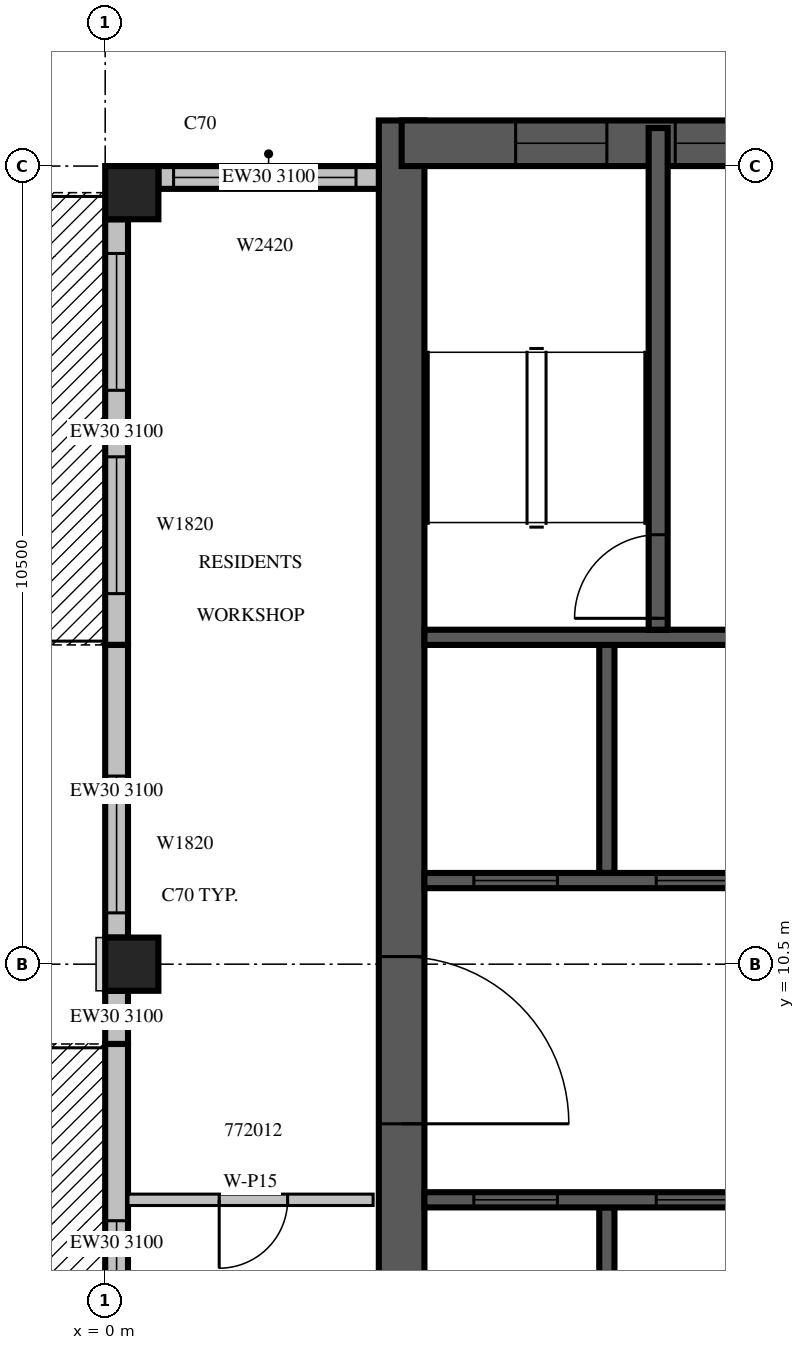
"""IFC4 building model, lengths in metres.
Left out: names, types, materials, properties, quantities, classifications, styles, units other than length and angle.
Written with IfcOpenShell. Run it as: python <this file> out.ifc"""

import sys

from ifc_helpers import new_model, si_unit, direction, frame, frame_2d, origin, origin_2d, place, context, subcontext, project, spatial, rectangle, extrude, source, transform, mapped, element, fill, save


model = new_model("IFC4")
c1 = context("Model", 3, precision=1e-05, world=origin(), true_north=direction((0.0, 1.0)))
c2 = subcontext(c1, "Body", "Model", "MODEL_VIEW")
j1 = project(units=[si_unit("LENGTHUNIT", "METRE"), si_unit("PLANEANGLEUNIT", "RADIAN")], contexts=[c1])
p1 = place(None, origin())
s1 = spatial("IfcSite", under=j1, at=p1, CompositionType="ELEMENT")
p2 = place(p1, origin())
s2 = spatial("IfcBuilding", under=s1, at=p2, CompositionType="ELEMENT")
p3 = place(p2, frame((0.0, 0.0, 312.5)))
s3 = spatial("IfcBuildingStorey", under=s2, at=p3, CompositionType="ELEMENT", Elevation=312.5)
m1 = source(origin(), c2, "Body", "SweptSolid", [
    extrude(rectangle(XDim=0.7, YDim=0.7, at=origin_2d()), origin(), (0.0, 0.0, 1.0), 3.5),
])
for number, where, z_axis, x_axis in (
    (1, (0.35, 10.5, 0.0), (0.0, 0.0, 1.0), (1.0, 0.0, 0.0)),
    (2, (0.35, 20.65, 0.0), (0.0, 0.0, 1.0), (1.0, 0.0, 0.0)),
):
    element("IfcColumn", number, at=place(p3, frame(where, z_axis=z_axis, x_axis=x_axis)), inside=s3, PredefinedType="COLUMN", context=c2, shape_type="MappedRepresentation", body=[
        mapped(m1, transform((0.0, 0.0, 0.0), scale=1.0)),
    ])
m2 = source(origin(), c2, "Body", "SweptSolid", [
    extrude(rectangle(XDim=17.4, YDim=0.6, at=frame_2d((8.7, 0.0))), origin(), (0.0, 0.0, 1.0), 3.5),
])
p4 = place(p3, frame((3.9, 4.2, 0.0), z_axis=(0.0, 0.0, 1.0), x_axis=(0.0, 1.0, 0.0)))
e3 = element("IfcWall", 3, at=p4, inside=s3, PredefinedType="SHEAR", context=c2, shape_type="MappedRepresentation", body=[
    mapped(m2, transform((0.0, 0.0, 0.0), scale=1.0)),
])
m3 = source(origin(), c2, "Body", "SweptSolid", [
    extrude(rectangle(XDim=2.2, YDim=2.1, at=frame_2d((1.1, 1.05))), frame((0.0, 0.31, 0.0), z_axis=(0.0, -1.0, 0.0), x_axis=(1.0, 0.0, 0.0)), (0.0, 0.0, 1.0), 0.62),
])
p5 = place(p4, frame((4.2, 0.0, 0.0)))
e4 = element("IfcOpeningElement", 4, at=p5, cuts=e3, PredefinedType="OPENING", context=c2, shape_type="MappedRepresentation", body=[
    mapped(m3, transform((0.0, 0.0, 0.0), scale=1.0)),
])
m4 = source(origin(), c2, "Body", "SweptSolid", [
    extrude(rectangle(XDim=6.6, YDim=0.6, at=frame_2d((3.3, 0.0))), origin(), (0.0, 0.0, 1.0), 3.5),
])
p6 = place(p3, frame((3.9, 21.3, 0.0), z_axis=(0.0, 0.0, 1.0), x_axis=(1.0, 0.0, 0.0)))
e5 = element("IfcWall", 5, at=p6, inside=s3, PredefinedType="SHEAR", context=c2, shape_type="MappedRepresentation", body=[
    mapped(m4, transform((0.0, 0.0, 0.0), scale=1.0)),
])
m5 = source(origin(), c2, "Body", "SweptSolid", [
    extrude(rectangle(XDim=1.2, YDim=2.4, at=frame_2d((0.6, 1.2))), frame((0.0, 0.31, 0.0), z_axis=(0.0, -1.0, 0.0), x_axis=(1.0, 0.0, 0.0)), (0.0, 0.0, 1.0), 0.62),
])
p7 = place(p6, frame((1.5, 0.0, 0.6)))
e6 = element("IfcOpeningElement", 6, at=p7, cuts=e5, PredefinedType="OPENING", context=c2, shape_type="MappedRepresentation", body=[
    mapped(m5, transform((0.0, 0.0, 0.0), scale=1.0)),
])
p8 = place(p6, frame((3.6, 0.0, 0.6)))
e7 = element("IfcOpeningElement", 7, at=p8, cuts=e5, PredefinedType="OPENING", context=c2, shape_type="MappedRepresentation", body=[
    mapped(m5, transform((0.0, 0.0, 0.0), scale=1.0)),
])
m6 = source(origin(), c2, "Body", "SweptSolid", [
    extrude(rectangle(XDim=2.9, YDim=0.3, at=frame_2d((1.45, 0.0))), origin(), (0.0, 0.0, 1.0), 3.1),
])
p9 = place(p3, frame((3.6, 20.85, 0.0), z_axis=(0.0, 0.0, 1.0), x_axis=(-1.0, 0.0, 0.0)))
e8 = element("IfcWall", 8, at=p9, inside=s3, PredefinedType="STANDARD", context=c2, shape_type="MappedRepresentation", body=[
    mapped(m6, transform((0.0, 0.0, 0.0), scale=1.0)),
])
m7 = source(origin(), c2, "Body", "SweptSolid", [
    extrude(rectangle(XDim=2.4, YDim=2.0, at=frame_2d((1.2, 1.0))), frame((0.0, 0.16, 0.0), z_axis=(0.0, -1.0, 0.0), x_axis=(1.0, 0.0, 0.0)), (0.0, 0.0, 1.0), 0.32),
])
p10 = place(p9, frame((0.3, 0.0, 0.6)))
e9 = element("IfcOpeningElement", 9, at=p10, cuts=e8, PredefinedType="OPENING", context=c2, shape_type="MappedRepresentation", body=[
    mapped(m7, transform((0.0, 0.0, 0.0), scale=1.0)),
])
m8 = source(origin(), c2, "Body", "SweptSolid", [
    extrude(rectangle(XDim=5.6, YDim=0.3, at=frame_2d((2.8, 0.0))), origin(), (0.0, 0.0, 1.0), 3.1),
])
p11 = place(p3, frame((0.15, 20.3, 0.0), z_axis=(0.0, 0.0, 1.0), x_axis=(0.0, -1.0, 0.0)))
e10 = element("IfcWall", 10, at=p11, inside=s3, PredefinedType="STANDARD", context=c2, shape_type="MappedRepresentation", body=[
    mapped(m8, transform((0.0, 0.0, 0.0), scale=1.0)),
])
m9 = source(origin(), c2, "Body", "SweptSolid", [
    extrude(rectangle(XDim=1.8, YDim=2.4, at=frame_2d((0.9, 1.2))), frame((0.0, 0.16, 0.0), z_axis=(0.0, -1.0, 0.0), x_axis=(1.0, 0.0, 0.0)), (0.0, 0.0, 1.0), 0.32),
])
p12 = place(p11, frame((0.45, 0.0, 0.0)))
e11 = element("IfcOpeningElement", 11, at=p12, cuts=e10, PredefinedType="OPENING", context=c2, shape_type="MappedRepresentation", body=[
    mapped(m9, transform((0.0, 0.0, 0.0), scale=1.0)),
])
m10 = source(origin(), c2, "Body", "SweptSolid", [
    extrude(rectangle(XDim=1.8, YDim=2.0, at=frame_2d((0.9, 1.0))), frame((0.0, 0.16, 0.0), z_axis=(0.0, -1.0, 0.0), x_axis=(1.0, 0.0, 0.0)), (0.0, 0.0, 1.0), 0.32),
])
p13 = place(p11, frame((3.125, 0.0, 0.6)))
e12 = element("IfcOpeningElement", 12, at=p13, cuts=e10, PredefinedType="OPENING", context=c2, shape_type="MappedRepresentation", body=[
    mapped(m10, transform((0.0, 0.0, 0.0), scale=1.0)),
])
m11 = source(origin(), c2, "Body", "SweptSolid", [
    extrude(rectangle(XDim=3.85, YDim=0.3, at=frame_2d((1.925, 0.0))), origin(), (0.0, 0.0, 1.0), 3.1),
])
p14 = place(p3, frame((0.15, 14.7, 0.0), z_axis=(0.0, 0.0, 1.0), x_axis=(0.0, -1.0, 0.0)))
e13 = element("IfcWall", 13, at=p14, inside=s3, PredefinedType="STANDARD", context=c2, shape_type="MappedRepresentation", body=[
    mapped(m11, transform((0.0, 0.0, 0.0), scale=1.0)),
])
p15 = place(p14, frame((1.725, 0.0, 0.6)))
e14 = element("IfcOpeningElement", 14, at=p15, cuts=e13, PredefinedType="OPENING", context=c2, shape_type="MappedRepresentation", body=[
    mapped(m10, transform((0.0, 0.0, 0.0), scale=1.0)),
])
m12 = source(origin(), c2, "Body", "SweptSolid", [
    extrude(rectangle(XDim=0.7, YDim=0.3, at=frame_2d((0.35, 0.0))), origin(), (0.0, 0.0, 1.0), 3.1),
])
p16 = place(p3, frame((0.15, 10.15, 0.0), z_axis=(0.0, 0.0, 1.0), x_axis=(0.0, -1.0, 0.0)))
e15 = element("IfcWall", 15, at=p16, inside=s3, PredefinedType="STANDARD", context=c2, shape_type="MappedRepresentation", body=[
    mapped(m12, transform((0.0, 0.0, 0.0), scale=1.0)),
])
m13 = source(origin(), c2, "Body", "SweptSolid", [
    extrude(rectangle(XDim=5.25, YDim=0.3, at=frame_2d((2.625, 0.0))), origin(), (0.0, 0.0, 1.0), 3.1),
])
p17 = place(p3, frame((0.15, 9.45, 0.0), z_axis=(0.0, 0.0, 1.0), x_axis=(0.0, -1.0, 0.0)))
e16 = element("IfcWall", 16, at=p17, inside=s3, PredefinedType="STANDARD", context=c2, shape_type="MappedRepresentation", body=[
    mapped(m13, transform((0.0, 0.0, 0.0), scale=1.0)),
])
p18 = place(p17, frame((2.325, 0.0, 0.0)))
e17 = element("IfcOpeningElement", 17, at=p18, cuts=e16, PredefinedType="OPENING", context=c2, shape_type="MappedRepresentation", body=[
    mapped(m9, transform((0.0, 0.0, 0.0), scale=1.0)),
])
m14 = source(origin(), c2, "Body", "SweptSolid", [
    extrude(rectangle(XDim=3.1, YDim=0.2, at=frame_2d((1.55, 0.0))), origin(), (0.0, 0.0, 1.0), 3.5),
])
p19 = place(p3, frame((6.6, 4.2, 0.0), z_axis=(0.0, 0.0, 1.0), x_axis=(0.0, 1.0, 0.0)))
e18 = element("IfcWall", 18, at=p19, inside=s3, PredefinedType="SOLIDWALL", context=c2, shape_type="MappedRepresentation", body=[
    mapped(m14, transform((0.0, 0.0, 0.0), scale=1.0)),
])
m15 = source(origin(), c2, "Body", "SweptSolid", [
    extrude(rectangle(XDim=3.0, YDim=0.2, at=frame_2d((1.5, 0.0))), origin(), (0.0, 0.0, 1.0), 3.5),
])
p20 = place(p3, frame((6.6, 11.7, 0.0), z_axis=(0.0, 0.0, 1.0), x_axis=(0.0, 1.0, 0.0)))
e19 = element("IfcWall", 19, at=p20, inside=s3, PredefinedType="SOLIDWALL", context=c2, shape_type="MappedRepresentation", body=[
    mapped(m15, transform((0.0, 0.0, 0.0), scale=1.0)),
])
m16 = source(origin(), c2, "Body", "SweptSolid", [
    extrude(rectangle(XDim=9.6, YDim=0.2, at=frame_2d((4.8, 0.0))), origin(), (0.0, 0.0, 1.0), 3.5),
])
p21 = place(p3, frame((4.2, 7.4, 0.0), z_axis=(0.0, 0.0, 1.0), x_axis=(1.0, 0.0, 0.0)))
e20 = element("IfcWall", 20, at=p21, inside=s3, PredefinedType="SOLIDWALL", context=c2, shape_type="MappedRepresentation", body=[
    mapped(m16, transform((0.0, 0.0, 0.0), scale=1.0)),
])
m17 = source(origin(), c2, "Body", "SweptSolid", [
    extrude(rectangle(XDim=1.1, YDim=2.1, at=frame_2d((0.55, 1.05))), frame((0.0, 0.11, 0.0), z_axis=(0.0, -1.0, 0.0), x_axis=(1.0, 0.0, 0.0)), (0.0, 0.0, 1.0), 0.22),
])
p22 = place(p21, frame((0.65, 0.0, 0.0)))
e21 = element("IfcOpeningElement", 21, at=p22, cuts=e20, PredefinedType="OPENING", context=c2, shape_type="MappedRepresentation", body=[
    mapped(m17, transform((0.0, 0.0, 0.0), scale=1.0)),
])
p23 = place(p21, frame((3.05, 0.0, 0.0)))
e22 = element("IfcOpeningElement", 22, at=p23, cuts=e20, PredefinedType="OPENING", context=c2, shape_type="MappedRepresentation", body=[
    mapped(m17, transform((0.0, 0.0, 0.0), scale=1.0)),
])
p24 = place(p21, frame((5.45, 0.0, 0.0)))
e23 = element("IfcOpeningElement", 23, at=p24, cuts=e20, PredefinedType="OPENING", context=c2, shape_type="MappedRepresentation", body=[
    mapped(m17, transform((0.0, 0.0, 0.0), scale=1.0)),
])
p25 = place(p21, frame((7.85, 0.0, 0.0)))
e24 = element("IfcOpeningElement", 24, at=p25, cuts=e20, PredefinedType="OPENING", context=c2, shape_type="MappedRepresentation", body=[
    mapped(m17, transform((0.0, 0.0, 0.0), scale=1.0)),
])
m18 = source(origin(), c2, "Body", "SweptSolid", [
    extrude(rectangle(XDim=4.8, YDim=0.2, at=frame_2d((2.4, 0.0))), origin(), (0.0, 0.0, 1.0), 3.5),
])
p26 = place(p3, frame((4.2, 11.6, 0.0), z_axis=(0.0, 0.0, 1.0), x_axis=(1.0, 0.0, 0.0)))
e25 = element("IfcWall", 25, at=p26, inside=s3, PredefinedType="SOLIDWALL", context=c2, shape_type="MappedRepresentation", body=[
    mapped(m18, transform((0.0, 0.0, 0.0), scale=1.0)),
])
p27 = place(p26, frame((0.65, 0.0, 0.0)))
e26 = element("IfcOpeningElement", 26, at=p27, cuts=e25, PredefinedType="OPENING", context=c2, shape_type="MappedRepresentation", body=[
    mapped(m17, transform((0.0, 0.0, 0.0), scale=1.0)),
])
p28 = place(p26, frame((3.05, 0.0, 0.0)))
e27 = element("IfcOpeningElement", 27, at=p28, cuts=e25, PredefinedType="OPENING", context=c2, shape_type="MappedRepresentation", body=[
    mapped(m17, transform((0.0, 0.0, 0.0), scale=1.0)),
])
p29 = place(p3, frame((4.2, 14.8, 0.0), z_axis=(0.0, 0.0, 1.0), x_axis=(1.0, 0.0, 0.0)))
e28 = element("IfcWall", 28, at=p29, inside=s3, PredefinedType="SOLIDWALL", context=c2, shape_type="MappedRepresentation", body=[
    mapped(m18, transform((0.0, 0.0, 0.0), scale=1.0)),
])
m19 = source(origin(), c2, "Body", "SweptSolid", [
    extrude(rectangle(XDim=6.6, YDim=0.25, at=frame_2d((3.3, 0.0))), origin(), (0.0, 0.0, 1.0), 3.1),
])
p30 = place(p3, frame((7.275, 14.9, 0.0), z_axis=(0.0, 0.0, 1.0), x_axis=(0.0, 1.0, 0.0)))
e29 = element("IfcWall", 29, at=p30, inside=s3, PredefinedType="SOLIDWALL", context=c2, shape_type="MappedRepresentation", body=[
    mapped(m19, transform((0.0, 0.0, 0.0), scale=1.0)),
])
m20 = source(origin(), c2, "Body", "SweptSolid", [
    extrude(rectangle(XDim=1.1, YDim=2.1, at=frame_2d((0.55, 1.05))), frame((0.0, 0.135, 0.0), z_axis=(0.0, -1.0, 0.0), x_axis=(1.0, 0.0, 0.0)), (0.0, 0.0, 1.0), 0.27),
])
p31 = place(p30, frame((0.15, 0.0, 0.0)))
e30 = element("IfcOpeningElement", 30, at=p31, cuts=e29, PredefinedType="OPENING", context=c2, shape_type="MappedRepresentation", body=[
    mapped(m20, transform((0.0, 0.0, 0.0), scale=1.0)),
])
m21 = source(origin(), c2, "Body", "SweptSolid", [
    extrude(rectangle(XDim=3.225, YDim=0.15, at=frame_2d((1.613, 0.0))), origin(), (0.0, 0.0, 1.0), 3.1),
])
p32 = place(p3, frame((0.3, 7.4, 0.0), z_axis=(0.0, 0.0, 1.0), x_axis=(1.0, 0.0, 0.0)))
e31 = element("IfcWall", 31, at=p32, inside=s3, PredefinedType="PARTITIONING", context=c2, shape_type="MappedRepresentation", body=[
    mapped(m21, transform((0.0, 0.0, 0.0), scale=1.0)),
])
m22 = source(origin(), c2, "Body", "SweptSolid", [
    extrude(rectangle(XDim=0.9, YDim=2.1, at=frame_2d((0.45, 1.05))), frame((0.0, 0.085, 0.0), z_axis=(0.0, -1.0, 0.0), x_axis=(1.0, 0.0, 0.0)), (0.0, 0.0, 1.0), 0.17),
])
p33 = place(p32, frame((1.2, 0.0, 0.0)))
e32 = element("IfcOpeningElement", 32, at=p33, cuts=e31, PredefinedType="OPENING", context=c2, shape_type="MappedRepresentation", body=[
    mapped(m22, transform((0.0, 0.0, 0.0), scale=1.0)),
])
m23 = source(origin(), c2, "Body", "SweptSolid", [
    extrude(rectangle(XDim=2.4, YDim=2.0, at=frame_2d((1.2, 1.0))), frame((0.0, 0.03, 0.0), z_axis=(0.0, -1.0, 0.0), x_axis=(1.0, 0.0, 0.0)), (0.0, 0.0, 1.0), 0.06),
])
p34 = place(p10, origin())
e33 = element("IfcWindow", 33, at=p34, inside=s3, PartitioningType="SINGLE_PANEL", PredefinedType="WINDOW", context=c2, shape_type="MappedRepresentation", body=[
    mapped(m23, transform((0.0, 0.0, 0.0), scale=1.0)),
])
fill(e9, e33)
m24 = source(origin(), c2, "Body", "SweptSolid", [
    extrude(rectangle(XDim=1.8, YDim=2.4, at=frame_2d((0.9, 1.2))), frame((0.0, 0.025, 0.0), z_axis=(0.0, -1.0, 0.0), x_axis=(1.0, 0.0, 0.0)), (0.0, 0.0, 1.0), 0.05),
])
p35 = place(p12, origin())
e34 = element("IfcDoor", 34, at=p35, inside=s3, OperationType="SLIDING_TO_LEFT", PredefinedType="DOOR", context=c2, shape_type="MappedRepresentation", body=[
    mapped(m24, transform((0.0, 0.0, 0.0), scale=1.0)),
])
fill(e11, e34)
m25 = source(origin(), c2, "Body", "SweptSolid", [
    extrude(rectangle(XDim=1.8, YDim=2.0, at=frame_2d((0.9, 1.0))), frame((0.0, 0.03, 0.0), z_axis=(0.0, -1.0, 0.0), x_axis=(1.0, 0.0, 0.0)), (0.0, 0.0, 1.0), 0.06),
])
p36 = place(p13, origin())
e35 = element("IfcWindow", 35, at=p36, inside=s3, PartitioningType="SINGLE_PANEL", PredefinedType="WINDOW", context=c2, shape_type="MappedRepresentation", body=[
    mapped(m25, transform((0.0, 0.0, 0.0), scale=1.0)),
])
fill(e12, e35)
p37 = place(p15, origin())
e36 = element("IfcWindow", 36, at=p37, inside=s3, PartitioningType="SINGLE_PANEL", PredefinedType="WINDOW", context=c2, shape_type="MappedRepresentation", body=[
    mapped(m25, transform((0.0, 0.0, 0.0), scale=1.0)),
])
fill(e14, e36)
p38 = place(p18, origin())
e37 = element("IfcDoor", 37, at=p38, inside=s3, OperationType="SLIDING_TO_LEFT", PredefinedType="DOOR", context=c2, shape_type="MappedRepresentation", body=[
    mapped(m24, transform((0.0, 0.0, 0.0), scale=1.0)),
])
fill(e17, e37)
m26 = source(origin(), c2, "Body", "SweptSolid", [
    extrude(rectangle(XDim=1.1, YDim=2.1, at=frame_2d((0.55, 1.05))), frame((0.0, 0.025, 0.0), z_axis=(0.0, -1.0, 0.0), x_axis=(1.0, 0.0, 0.0)), (0.0, 0.0, 1.0), 0.05),
])
p39 = place(p22, origin())
e38 = element("IfcDoor", 38, at=p39, inside=s3, OperationType="SLIDING_TO_LEFT", PredefinedType="DOOR", context=c2, shape_type="MappedRepresentation", body=[
    mapped(m26, transform((0.0, 0.0, 0.0), scale=1.0)),
])
fill(e21, e38)
p40 = place(p23, origin())
e39 = element("IfcDoor", 39, at=p40, inside=s3, OperationType="SLIDING_TO_LEFT", PredefinedType="DOOR", context=c2, shape_type="MappedRepresentation", body=[
    mapped(m26, transform((0.0, 0.0, 0.0), scale=1.0)),
])
fill(e22, e39)
p41 = place(p27, origin())
e40 = element("IfcDoor", 40, at=p41, inside=s3, OperationType="SLIDING_TO_LEFT", PredefinedType="DOOR", context=c2, shape_type="MappedRepresentation", body=[
    mapped(m26, transform((0.0, 0.0, 0.0), scale=1.0)),
])
fill(e26, e40)
p42 = place(p28, origin())
e41 = element("IfcDoor", 41, at=p42, inside=s3, OperationType="SLIDING_TO_LEFT", PredefinedType="DOOR", context=c2, shape_type="MappedRepresentation", body=[
    mapped(m26, transform((0.0, 0.0, 0.0), scale=1.0)),
])
fill(e27, e41)
p43 = place(p31, origin())
e42 = element("IfcDoor", 42, at=p43, inside=s3, OperationType="SINGLE_SWING_LEFT", PredefinedType="DOOR", context=c2, shape_type="MappedRepresentation", body=[
    mapped(m26, transform((0.0, 0.0, 0.0), scale=1.0)),
])
fill(e30, e42)
m27 = source(origin(), c2, "Body", "SweptSolid", [
    extrude(rectangle(XDim=2.2, YDim=2.1, at=frame_2d((1.1, 1.05))), frame((0.0, 0.025, 0.0), z_axis=(0.0, -1.0, 0.0), x_axis=(1.0, 0.0, 0.0)), (0.0, 0.0, 1.0), 0.05),
])
p44 = place(p5, origin())
e43 = element("IfcDoor", 43, at=p44, inside=s3, OperationType="DOUBLE_DOOR_SINGLE_SWING", PredefinedType="DOOR", context=c2, shape_type="MappedRepresentation", body=[
    mapped(m27, transform((0.0, 0.0, 0.0), scale=1.0)),
])
fill(e4, e43)
m28 = source(origin(), c2, "Body", "SweptSolid", [
    extrude(rectangle(XDim=1.2, YDim=2.4, at=frame_2d((0.6, 1.2))), frame((0.0, 0.03, 0.0), z_axis=(0.0, -1.0, 0.0), x_axis=(1.0, 0.0, 0.0)), (0.0, 0.0, 1.0), 0.06),
])
p45 = place(p7, origin())
e44 = element("IfcWindow", 44, at=p45, inside=s3, PartitioningType="SINGLE_PANEL", PredefinedType="WINDOW", context=c2, shape_type="MappedRepresentation", body=[
    mapped(m28, transform((0.0, 0.0, 0.0), scale=1.0)),
])
fill(e6, e44)
p46 = place(p8, origin())
e45 = element("IfcWindow", 45, at=p46, inside=s3, PartitioningType="SINGLE_PANEL", PredefinedType="WINDOW", context=c2, shape_type="MappedRepresentation", body=[
    mapped(m28, transform((0.0, 0.0, 0.0), scale=1.0)),
])
fill(e7, e45)
m29 = source(origin(), c2, "Body", "SweptSolid", [
    extrude(rectangle(XDim=0.9, YDim=2.1, at=frame_2d((0.45, 1.05))), frame((0.0, 0.025, 0.0), z_axis=(0.0, -1.0, 0.0), x_axis=(1.0, 0.0, 0.0)), (0.0, 0.0, 1.0), 0.05),
])
p47 = place(p33, origin())
e46 = element("IfcDoor", 46, at=p47, inside=s3, OperationType="SINGLE_SWING_RIGHT", PredefinedType="DOOR", context=c2, shape_type="MappedRepresentation", body=[
    mapped(m29, transform((0.0, 0.0, 0.0), scale=1.0)),
])
fill(e32, e46)
save(model, sys.argv[1])
